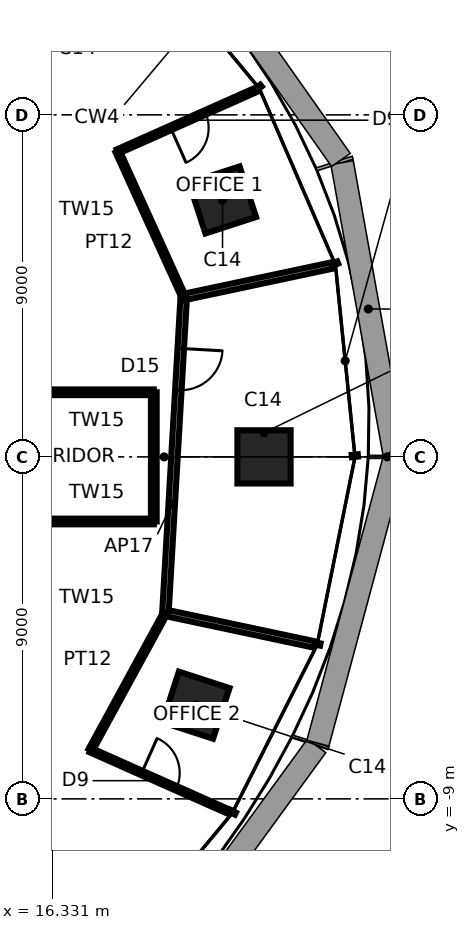
"""IFC4 building model, lengths in metres.
Left out: names, types, materials, properties, quantities, classifications, styles, units other than length and angle.
Written with IfcOpenShell. Run it as: python <this file> out.ifc"""

import sys

from ifc_helpers import new_model, si_unit, direction, frame, frame_2d, origin, origin_2d, place, context, subcontext, project, spatial, rectangle, extrude, element, fill, save


model = new_model("IFC4")
c1 = context("Model", 3, precision=1e-05, world=origin(), true_north=direction((0.0, 1.0)))
c2 = subcontext(c1, "Body", "Model", "MODEL_VIEW")
j1 = project(units=[si_unit("LENGTHUNIT", "METRE"), si_unit("PLANEANGLEUNIT", "RADIAN")], contexts=[c1])
p1 = place(None, origin())
s1 = spatial("IfcSite", under=j1, at=p1, CompositionType="ELEMENT")
p2 = place(p1, origin())
s2 = spatial("IfcBuilding", under=s1, at=p2, CompositionType="ELEMENT")
p3 = place(p2, frame((0.0, 0.0, 207.2)))
s3 = spatial("IfcBuildingStorey", under=s2, at=p3, CompositionType="ELEMENT", Elevation=207.2)
for number, where, z_axis, x_axis in (
    (1, (21.9, 0.0, 0.0), (0.0, 0.0, 1.0), (1.0, 0.0, 0.0)),
    (2, (20.808, 6.761, 0.0), (0.0, 0.0, 1.0), (0.951, 0.309, 0.0)),
    (3, (20.109, -6.534, 0.0), (0.0, 0.0, 1.0), (0.951, -0.309, 0.0)),
):
    element("IfcColumn", number, at=place(p3, frame(where, z_axis=z_axis, x_axis=x_axis)), inside=s3, PredefinedType="COLUMN", context=c2, shape_type="SweptSolid", body=[
        extrude(rectangle(XDim=1.4, YDim=1.4, at=origin_2d()), origin(), (0.0, 0.0, 1.0), 3.9),
    ])
p4 = place(p3, frame((17.335, -7.718, 0.0), z_axis=(0.0, 0.0, 1.0), x_axis=(0.913549606868, -0.406727323635, 0.0)))
e4 = element("IfcWall", 4, at=p4, inside=s3, PredefinedType="PARTITIONING", context=c2, shape_type="SweptSolid", body=[
    extrude(rectangle(XDim=4.0, YDim=0.12, at=frame_2d((2.0, 0.0))), origin(), (0.0, 0.0, 1.0), 3.74),
])
p5 = place(p4, frame((1.474, 0.0, 0.0)))
e5 = element("IfcOpeningElement", 5, at=p5, cuts=e4, PredefinedType="OPENING", context=c2, shape_type="SweptSolid", body=[
    extrude(rectangle(XDim=1.0, YDim=2.4, at=frame_2d((0.5, 1.2))), frame((0.0, 0.07, 0.0), z_axis=(0.0, -1.0, 0.0), x_axis=(1.0, 0.0, 0.0)), (0.0, 0.0, 1.0), 0.14),
])
p6 = place(p3, frame((19.306, -4.104, 0.0), z_axis=(0.0, 0.0, 1.0), x_axis=(-0.478739945202, -0.877956755694, 0.0)))
e6 = element("IfcWall", 6, at=p6, inside=s3, PredefinedType="PARTITIONING", context=c2, shape_type="SweptSolid", body=[
    extrude(rectangle(XDim=4.117, YDim=0.12, at=frame_2d((2.059, 0.0))), origin(), (0.0, 0.0, 1.0), 3.74),
])
p7 = place(p3, frame((19.306, -4.104, 0.0), z_axis=(0.0, 0.0, 1.0), x_axis=(0.978137903693, -0.207957306576, 0.0)))
e7 = element("IfcWall", 7, at=p7, inside=s3, PredefinedType="PARTITIONING", context=c2, shape_type="SweptSolid", body=[
    extrude(rectangle(XDim=4.0, YDim=0.17, at=frame_2d((2.0, 0.0))), origin(), (0.0, 0.0, 1.0), 3.74),
])
p8 = place(p3, frame((16.0, -1.7, 0.0), z_axis=(0.0, 0.0, 1.0), x_axis=(1.0, 0.0, 0.0)))
e8 = element("IfcWall", 8, at=p8, inside=s3, PredefinedType="PARTITIONING", context=c2, shape_type="SweptSolid", body=[
    extrude(rectangle(XDim=3.0, YDim=0.15, at=frame_2d((1.5, 0.0))), origin(), (0.0, 0.0, 1.0), 3.74),
])
p9 = place(p3, frame((19.0, -1.7, 0.0), z_axis=(0.0, 0.0, 1.0), x_axis=(0.0, 1.0, 0.0)))
e9 = element("IfcWall", 9, at=p9, inside=s3, PredefinedType="PARTITIONING", context=c2, shape_type="SweptSolid", body=[
    extrude(rectangle(XDim=3.4, YDim=0.15, at=frame_2d((1.7, 0.0))), origin(), (0.0, 0.0, 1.0), 3.334),
])
p10 = place(p3, frame((19.788, 4.206, 0.0), z_axis=(0.0, 0.0, 1.0), x_axis=(-0.0579293499, -0.998320685161, 0.0)))
e10 = element("IfcWall", 10, at=p10, inside=s3, PredefinedType="PARTITIONING", context=c2, shape_type="SweptSolid", body=[
    extrude(rectangle(XDim=8.323, YDim=0.17, at=frame_2d((4.162, 0.0))), origin(), (0.0, 0.0, 1.0), 3.74),
])
p11 = place(p10, frame((1.354, 0.0, 0.0)))
e11 = element("IfcOpeningElement", 11, at=p11, cuts=e10, PredefinedType="OPENING", context=c2, shape_type="SweptSolid", body=[
    extrude(rectangle(XDim=1.1, YDim=2.4, at=frame_2d((0.55, 1.2))), frame((0.0, 0.095, 0.0), z_axis=(0.0, -1.0, 0.0), x_axis=(1.0, 0.0, 0.0)), (0.0, 0.0, 1.0), 0.19),
])
p12 = place(p3, frame((19.0, 1.7, 0.0), z_axis=(0.0, 0.0, 1.0), x_axis=(-1.0, 0.0, 0.0)))
e12 = element("IfcWall", 12, at=p12, inside=s3, PredefinedType="PARTITIONING", context=c2, shape_type="SweptSolid", body=[
    extrude(rectangle(XDim=3.0, YDim=0.15, at=frame_2d((1.5, 0.0))), origin(), (0.0, 0.0, 1.0), 3.74),
])
p13 = place(p3, frame((23.7, 5.038, 0.0), z_axis=(0.0, 0.0, 1.0), x_axis=(-0.978152955943, -0.207886494942, 0.0)))
e13 = element("IfcWall", 13, at=p13, inside=s3, PredefinedType="PARTITIONING", context=c2, shape_type="SweptSolid", body=[
    extrude(rectangle(XDim=4.0, YDim=0.17, at=frame_2d((2.0, 0.0))), origin(), (0.0, 0.0, 1.0), 3.74),
])
p14 = place(p3, frame((18.049, 8.036, 0.0), z_axis=(0.0, 0.0, 1.0), x_axis=(0.413444314282, -0.910529405889, 0.0)))
e14 = element("IfcWall", 14, at=p14, inside=s3, PredefinedType="PARTITIONING", context=c2, shape_type="SweptSolid", body=[
    extrude(rectangle(XDim=4.206, YDim=0.12, at=frame_2d((2.103, 0.0))), origin(), (0.0, 0.0, 1.0), 3.74),
])
p15 = place(p3, frame((21.703, 9.663, 0.0), z_axis=(0.0, 0.0, 1.0), x_axis=(-0.913539509426, -0.406750002727, 0.0)))
e15 = element("IfcWall", 15, at=p15, inside=s3, PredefinedType="PARTITIONING", context=c2, shape_type="SweptSolid", body=[
    extrude(rectangle(XDim=4.0, YDim=0.12, at=frame_2d((2.0, 0.0))), origin(), (0.0, 0.0, 1.0), 3.74),
])
p16 = place(p15, frame((1.474, 0.0, 0.0)))
e16 = element("IfcOpeningElement", 16, at=p16, cuts=e15, PredefinedType="OPENING", context=c2, shape_type="SweptSolid", body=[
    extrude(rectangle(XDim=1.0, YDim=2.4, at=frame_2d((0.5, 1.2))), frame((0.0, 0.07, 0.0), z_axis=(0.0, -1.0, 0.0), x_axis=(1.0, 0.0, 0.0)), (0.0, 0.0, 1.0), 0.14),
])
p17 = place(p16, origin())
e17 = element("IfcDoor", 17, at=p17, inside=s3, OperationType="SINGLE_SWING_RIGHT", PredefinedType="DOOR", context=c2, shape_type="SweptSolid", body=[
    extrude(rectangle(XDim=1.0, YDim=2.4, at=frame_2d((0.5, 1.2))), frame((0.0, 0.025, 0.0), z_axis=(0.0, -1.0, 0.0), x_axis=(1.0, 0.0, 0.0)), (0.0, 0.0, 1.0), 0.05),
])
fill(e16, e17)
p18 = place(p5, origin())
e18 = element("IfcDoor", 18, at=p18, inside=s3, OperationType="SINGLE_SWING_LEFT", PredefinedType="DOOR", context=c2, shape_type="SweptSolid", body=[
    extrude(rectangle(XDim=1.0, YDim=2.4, at=frame_2d((0.5, 1.2))), frame((0.0, 0.025, 0.0), z_axis=(0.0, -1.0, 0.0), x_axis=(1.0, 0.0, 0.0)), (0.0, 0.0, 1.0), 0.05),
])
fill(e5, e18)
p19 = place(p11, origin())
e19 = element("IfcDoor", 19, at=p19, inside=s3, OperationType="SINGLE_SWING_LEFT", PredefinedType="DOOR", context=c2, shape_type="SweptSolid", body=[
    extrude(rectangle(XDim=1.1, YDim=2.4, at=frame_2d((0.55, 1.2))), frame((0.0, 0.025, 0.0), z_axis=(0.0, -1.0, 0.0), x_axis=(1.0, 0.0, 0.0)), (0.0, 0.0, 1.0), 0.05),
])
fill(e11, e19)
save(model, sys.argv[1])
